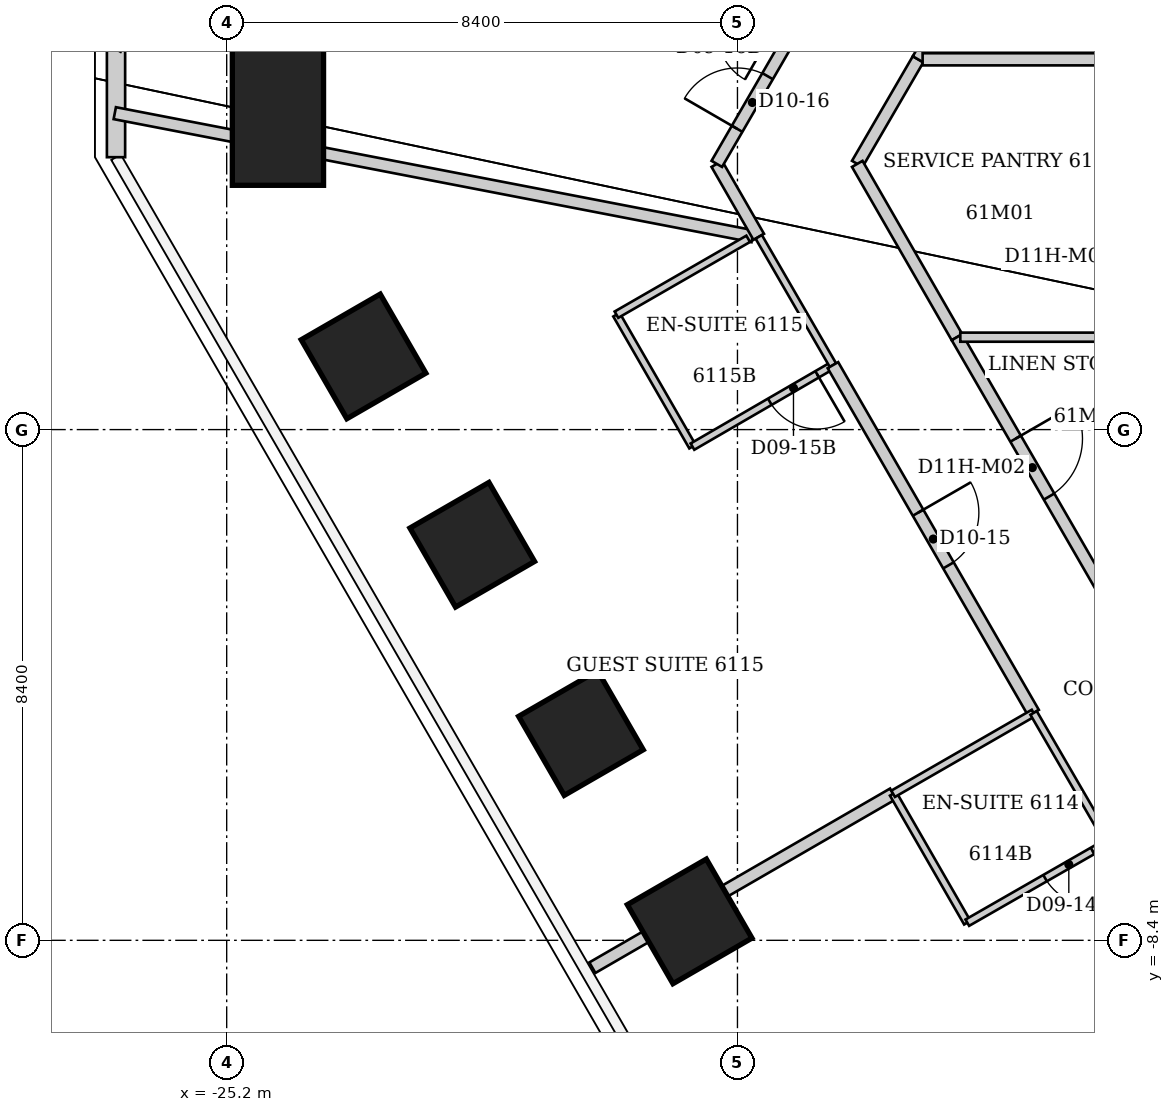
"""IFC4 building model, lengths in metres.
Left out: names, types, materials, properties, quantities, classifications, styles, units other than length and angle.
Written with IfcOpenShell. Run it as: python <this file> out.ifc"""

import sys

from ifc_helpers import new_model, si_unit, direction, frame, frame_2d, origin, origin_2d, place, context, subcontext, project, spatial, rectangle, extrude, element, fill, save


model = new_model("IFC4")
c1 = context("Model", 3, precision=1e-05, world=origin(), true_north=direction((0.0, 1.0)))
c2 = subcontext(c1, "Body", "Model", "MODEL_VIEW")
j1 = project(units=[si_unit("LENGTHUNIT", "METRE"), si_unit("PLANEANGLEUNIT", "RADIAN")], contexts=[c1])
p1 = place(None, origin())
s1 = spatial("IfcSite", under=j1, at=p1, CompositionType="ELEMENT")
p2 = place(p1, origin())
s2 = spatial("IfcBuilding", under=s1, at=p2, CompositionType="ELEMENT")
p3 = place(p2, frame((0.0, 0.0, 244.0)))
s3 = spatial("IfcBuildingStorey", under=s2, at=p3, CompositionType="ELEMENT", Elevation=244.0)
p4 = place(p3, frame((-17.586, -8.089, 0.0), z_axis=(0.049844531908, 0.022901541687, 0.998494387579), x_axis=(-0.864791617374, -0.499151535401, 0.054618707667)))
e1 = element("IfcColumn", 1, at=p4, inside=s3, PredefinedType="COLUMN", context=c2, shape_type="SweptSolid", body=[
    extrude(rectangle(XDim=1.5, YDim=1.5, at=origin_2d()), origin(), (0.0, 0.0, 1.0), 3.806),
])
p5 = place(p3, frame((-19.374, -4.991, 0.0), z_axis=(0.054906736272, 0.014111544369, 0.998391764102), x_axis=(-0.864606052926, -0.499473967902, 0.054608869531)))
e2 = element("IfcColumn", 2, at=p5, inside=s3, PredefinedType="COLUMN", context=c2, shape_type="SweptSolid", body=[
    extrude(rectangle(XDim=1.5, YDim=1.5, at=origin_2d()), origin(), (0.0, 0.0, 1.0), 3.806),
])
p6 = place(p3, frame((-21.162, -1.894, 0.0), z_axis=(0.059897811742, 0.005386955232, 0.998189978342), x_axis=(-0.863828729651, -0.500824842558, 0.05453808675)))
e3 = element("IfcColumn", 3, at=p6, inside=s3, PredefinedType="COLUMN", context=c2, shape_type="SweptSolid", body=[
    extrude(rectangle(XDim=1.5, YDim=1.5, at=origin_2d()), origin(), (0.0, 0.0, 1.0), 3.807),
])
p7 = place(p3, frame((-22.949, 1.203, 0.0), z_axis=(0.064944143672, -0.003397867339, 0.997883115751), x_axis=(-0.863717362202, -0.501020333053, 0.054506367508)))
e4 = element("IfcColumn", 4, at=p7, inside=s3, PredefinedType="COLUMN", context=c2, shape_type="SweptSolid", body=[
    extrude(rectangle(XDim=1.5, YDim=1.5, at=origin_2d()), origin(), (0.0, 0.0, 1.0), 3.808),
])
p8 = place(p3, frame((-24.357, 5.143, 0.0), z_axis=(0.069531443306, -0.014675300016, 0.997471811111), x_axis=(-0.99757975799, -0.001092604117, 0.069522893098)))
e5 = element("IfcColumn", 5, at=p8, inside=s3, PredefinedType="COLUMN", context=c2, shape_type="SweptSolid", body=[
    extrude(rectangle(XDim=1.5, YDim=2.25, at=origin_2d()), origin(), (0.0, 0.0, 1.0), 3.81),
])
p9 = place(p3, frame((-27.02, 4.48, 0.0), z_axis=(0.0, 0.0, 1.0), x_axis=(0.0, 1.0, 0.0)))
e6 = element("IfcWall", 6, at=p9, inside=s3, PredefinedType="SOLIDWALL", context=c2, shape_type="SweptSolid", body=[
    extrude(rectangle(XDim=1.77, YDim=0.3, at=frame_2d((0.885, 0.0))), origin(), (0.0, 0.0, 1.0), 3.64),
])
p10 = place(p3, frame((-27.041, 5.204, 0.0), z_axis=(0.0, 0.0, 1.0), x_axis=(0.981884490433, -0.18948046719, 0.0)))
e7 = element("IfcWall", 7, at=p10, inside=s3, PredefinedType="PARTITIONING", context=c2, shape_type="SweptSolid", body=[
    extrude(rectangle(XDim=10.684, YDim=0.2, at=frame_2d((5.342, 0.0))), origin(), (0.0, 0.0, 1.0), 3.64),
])
p11 = place(p3, frame((-19.186, -8.85, 0.0), z_axis=(0.0, 0.0, 1.0), x_axis=(0.865702137343, 0.500559496364, 0.0)))
e8 = element("IfcWall", 8, at=p11, inside=s3, PredefinedType="PARTITIONING", context=c2, shape_type="SweptSolid", body=[
    extrude(rectangle(XDim=5.713, YDim=0.2, at=frame_2d((2.857, 0.0))), origin(), (0.0, 0.0, 1.0), 3.64),
])
p12 = place(p3, frame((-18.79, 1.89, 0.0), z_axis=(0.0, 0.0, 1.0), x_axis=(0.499159685399, -0.866510016372, 0.0)))
e9 = element("IfcWall", 9, at=p12, inside=s3, PredefinedType="PARTITIONING", context=c2, shape_type="SweptSolid", body=[
    extrude(rectangle(XDim=2.504, YDim=0.12, at=frame_2d((1.252, 0.0))), origin(), (0.0, 0.0, 1.0), 3.64),
])
p13 = place(p3, frame((-17.54, -0.28, 0.0), z_axis=(0.0, 0.0, 1.0), x_axis=(0.86498992408, 0.501789229896, 0.0)))
e10 = element("IfcWall", 10, at=p13, inside=s3, PredefinedType="PARTITIONING", context=c2, shape_type="SweptSolid", body=[
    extrude(rectangle(XDim=2.671, YDim=0.12, at=frame_2d((1.335, 0.0))), origin(), (0.0, 0.0, 1.0), 3.64),
])
p14 = place(p13, frame((1.47, 0.0, 0.0)))
e11 = element("IfcOpeningElement", 11, at=p14, cuts=e10, PredefinedType="OPENING", context=c2, shape_type="SweptSolid", body=[
    extrude(rectangle(XDim=0.9, YDim=2.03, at=frame_2d((0.45, 1.015))), frame((0.0, 0.06, 0.0), z_axis=(0.0, -1.0, 0.0), x_axis=(1.0, 0.0, 0.0)), (0.0, 0.0, 1.0), 0.12),
])
p15 = place(p3, frame((-17.14, 4.37, 0.0), z_axis=(0.0, 0.0, 1.0), x_axis=(0.498378346744, -0.866959643522, 0.0)))
e12 = element("IfcWall", 12, at=p15, inside=s3, PredefinedType="PARTITIONING", context=c2, shape_type="SweptSolid", body=[
    extrude(rectangle(XDim=1.384, YDim=0.2, at=frame_2d((0.692, 0.0))), origin(), (0.0, 0.0, 1.0), 3.64),
])
p16 = place(p3, frame((-17.14, 4.37, 0.0), z_axis=(0.0, 0.0, 1.0), x_axis=(0.501176435338, 0.865345122285, 0.0)))
e13 = element("IfcWall", 13, at=p16, inside=s3, PredefinedType="PARTITIONING", context=c2, shape_type="SweptSolid", body=[
    extrude(rectangle(XDim=2.334, YDim=0.2, at=frame_2d((1.167, 0.0))), origin(), (0.0, 0.0, 1.0), 3.64),
])
p17 = place(p16, frame((0.667, 0.0, 0.0)))
e14 = element("IfcOpeningElement", 14, at=p17, cuts=e13, PredefinedType="OPENING", context=c2, shape_type="SweptSolid", body=[
    extrude(rectangle(XDim=1.0, YDim=2.13, at=frame_2d((0.5, 1.065))), frame((0.0, 0.1, 0.0), z_axis=(0.0, -1.0, 0.0), x_axis=(1.0, 0.0, 0.0)), (0.0, 0.0, 1.0), 0.2),
])
p18 = place(p3, frame((-16.624, 3.138, 0.0), z_axis=(0.0, 0.0, 1.0), x_axis=(-0.866525185869, -0.499133351175, 0.0)))
e15 = element("IfcWall", 15, at=p18, inside=s3, PredefinedType="PARTITIONING", context=c2, shape_type="SweptSolid", body=[
    extrude(rectangle(XDim=2.5, YDim=0.12, at=frame_2d((1.25, 0.0))), origin(), (0.0, 0.0, 1.0), 3.64),
])
p19 = place(p3, frame((-16.45, 3.17, 0.0), z_axis=(0.0, 0.0, 1.0), x_axis=(0.500566296323, -0.865698205488, 0.0)))
e16 = element("IfcWall", 16, at=p19, inside=s3, PredefinedType="PARTITIONING", context=c2, shape_type="SweptSolid", body=[
    extrude(rectangle(XDim=2.437, YDim=0.12, at=frame_2d((1.219, 0.0))), origin(), (0.0, 0.0, 1.0), 3.64),
])
p20 = place(p3, frame((-15.23, 1.06, 0.0), z_axis=(0.0, 0.0, 1.0), x_axis=(0.499729921425, -0.866181277581, 0.0)))
e17 = element("IfcWall", 17, at=p20, inside=s3, PredefinedType="PARTITIONING", context=c2, shape_type="SweptSolid", body=[
    extrude(rectangle(XDim=6.604, YDim=0.2, at=frame_2d((3.302, 0.0))), origin(), (0.0, 0.0, 1.0), 3.64),
])
p21 = place(p20, frame((2.802, 0.0, 0.0)))
e18 = element("IfcOpeningElement", 18, at=p21, cuts=e17, PredefinedType="OPENING", context=c2, shape_type="SweptSolid", body=[
    extrude(rectangle(XDim=1.0, YDim=2.13, at=frame_2d((0.5, 1.065))), frame((0.0, 0.1, 0.0), z_axis=(0.0, -1.0, 0.0), x_axis=(1.0, 0.0, 0.0)), (0.0, 0.0, 1.0), 0.2),
])
p22 = place(p3, frame((-14.83, 4.37, 0.0), z_axis=(0.0, 0.0, 1.0), x_axis=(0.502626855825, 0.864503466623, 0.0)))
e19 = element("IfcWall", 19, at=p22, inside=s3, PredefinedType="PARTITIONING", context=c2, shape_type="SweptSolid", body=[
    extrude(rectangle(XDim=1.99, YDim=0.2, at=frame_2d((0.995, 0.0))), origin(), (0.0, 0.0, 1.0), 3.64),
])
p23 = place(p3, frame((-14.24, -5.99, 0.0), z_axis=(0.0, 0.0, 1.0), x_axis=(0.498748634132, -0.866746675766, 0.0)))
e20 = element("IfcWall", 20, at=p23, inside=s3, PredefinedType="PARTITIONING", context=c2, shape_type="SweptSolid", body=[
    extrude(rectangle(XDim=2.446, YDim=0.12, at=frame_2d((1.223, 0.0))), origin(), (0.0, 0.0, 1.0), 3.64),
])
p24 = place(p3, frame((-14.24, -5.99, 0.0), z_axis=(0.0, 0.0, 1.0), x_axis=(0.866615255992, 0.498976951453, 0.0)))
e21 = element("IfcWall", 21, at=p24, inside=s3, PredefinedType="PARTITIONING", context=c2, shape_type="SweptSolid", body=[
    extrude(rectangle(XDim=2.666, YDim=0.12, at=frame_2d((1.333, 0.0))), origin(), (0.0, 0.0, 1.0), 3.64),
])
p25 = place(p3, frame((-13.83, 6.09, 0.0), z_axis=(0.0, 0.0, 1.0), x_axis=(0.500248310865, 0.865881993967, 0.0)))
e22 = element("IfcWall", 22, at=p25, inside=s3, PredefinedType="PARTITIONING", context=c2, shape_type="SweptSolid", body=[
    extrude(rectangle(XDim=5.278, YDim=0.2, at=frame_2d((2.639, 0.0))), origin(), (0.0, 0.0, 1.0), 3.64),
])
p26 = place(p3, frame((-13.755, 6.09, 0.0), z_axis=(0.0, 0.0, 1.0), x_axis=(1.0, 0.0, 0.0)))
e23 = element("IfcWall", 23, at=p26, inside=s3, PredefinedType="PARTITIONING", context=c2, shape_type="SweptSolid", body=[
    extrude(rectangle(XDim=3.195, YDim=0.2, at=frame_2d((1.597, 0.0))), origin(), (0.0, 0.0, 1.0), 3.64),
])
p27 = place(p3, frame((-13.19, 1.52, 0.0), z_axis=(0.0, 0.0, 1.0), x_axis=(-0.498775186059, 0.866731396554, 0.0)))
e24 = element("IfcWall", 24, at=p27, inside=s3, PredefinedType="PARTITIONING", context=c2, shape_type="SweptSolid", body=[
    extrude(rectangle(XDim=3.288, YDim=0.2, at=frame_2d((1.644, 0.0))), origin(), (0.0, 0.0, 1.0), 3.64),
])
p28 = place(p3, frame((-13.02, -8.11, 0.0), z_axis=(0.0, 0.0, 1.0), x_axis=(0.867545659855, 0.497357545501, 0.0)))
e25 = element("IfcWall", 25, at=p28, inside=s3, PredefinedType="PARTITIONING", context=c2, shape_type="SweptSolid", body=[
    extrude(rectangle(XDim=2.674, YDim=0.12, at=frame_2d((1.337, 0.0))), origin(), (0.0, 0.0, 1.0), 3.64),
])
p29 = place(p28, frame((1.474, 0.0, 0.0)))
e26 = element("IfcOpeningElement", 26, at=p29, cuts=e25, PredefinedType="OPENING", context=c2, shape_type="SweptSolid", body=[
    extrude(rectangle(XDim=0.9, YDim=2.03, at=frame_2d((0.45, 1.015))), frame((0.0, 0.06, 0.0), z_axis=(0.0, -1.0, 0.0), x_axis=(1.0, 0.0, 0.0)), (0.0, 0.0, 1.0), 0.12),
])
p30 = place(p3, frame((-11.93, -4.66, 0.0), z_axis=(0.0, 0.0, 1.0), x_axis=(0.501813488763, -0.864975850817, 0.0)))
e27 = element("IfcWall", 27, at=p30, inside=s3, PredefinedType="PARTITIONING", context=c2, shape_type="SweptSolid", body=[
    extrude(rectangle(XDim=2.451, YDim=0.12, at=frame_2d((1.226, 0.0))), origin(), (0.0, 0.0, 1.0), 3.64),
])
p31 = place(p3, frame((-10.55, -3.05, 0.0), z_axis=(0.0, 0.0, 1.0), x_axis=(-0.500193590286, 0.865913605527, 0.0)))
e28 = element("IfcWall", 28, at=p31, inside=s3, PredefinedType="PARTITIONING", context=c2, shape_type="SweptSolid", body=[
    extrude(rectangle(XDim=5.278, YDim=0.2, at=frame_2d((2.639, 0.0))), origin(), (0.0, 0.0, 1.0), 3.64),
])
p32 = place(p31, frame((2.25, 0.0, 0.0)))
e29 = element("IfcOpeningElement", 29, at=p32, cuts=e28, PredefinedType="OPENING", context=c2, shape_type="SweptSolid", body=[
    extrude(rectangle(XDim=1.1, YDim=2.2, at=frame_2d((0.55, 1.1))), frame((0.0, 0.1, 0.0), z_axis=(0.0, -1.0, 0.0), x_axis=(1.0, 0.0, 0.0)), (0.0, 0.0, 1.0), 0.2),
])
p33 = place(p3, frame((-10.55, 1.52, 0.0), z_axis=(0.0, 0.0, 1.0), x_axis=(-1.0, 0.0, 0.0)))
e30 = element("IfcWall", 30, at=p33, inside=s3, PredefinedType="PARTITIONING", context=c2, shape_type="SweptSolid", body=[
    extrude(rectangle(XDim=2.585, YDim=0.15, at=frame_2d((1.292, 0.0))), origin(), (0.0, 0.0, 1.0), 3.64),
])
p34 = place(p29, origin())
e31 = element("IfcDoor", 31, at=p34, inside=s3, OperationType="SINGLE_SWING_RIGHT", PredefinedType="DOOR", context=c2, shape_type="SweptSolid", body=[
    extrude(rectangle(XDim=0.9, YDim=2.03, at=frame_2d((0.45, 1.015))), frame((0.0, 0.025, 0.0), z_axis=(0.0, -1.0, 0.0), x_axis=(1.0, 0.0, 0.0)), (0.0, 0.0, 1.0), 0.05),
])
fill(e26, e31)
p35 = place(p21, origin())
e32 = element("IfcDoor", 32, at=p35, inside=s3, OperationType="SINGLE_SWING_LEFT", PredefinedType="DOOR", context=c2, shape_type="SweptSolid", body=[
    extrude(rectangle(XDim=1.0, YDim=2.13, at=frame_2d((0.5, 1.065))), frame((0.0, 0.025, 0.0), z_axis=(0.0, -1.0, 0.0), x_axis=(1.0, 0.0, 0.0)), (0.0, 0.0, 1.0), 0.05),
])
fill(e18, e32)
p36 = place(p14, origin())
e33 = element("IfcDoor", 33, at=p36, inside=s3, OperationType="SINGLE_SWING_RIGHT", PredefinedType="DOOR", context=c2, shape_type="SweptSolid", body=[
    extrude(rectangle(XDim=0.9, YDim=2.03, at=frame_2d((0.45, 1.015))), frame((0.0, 0.025, 0.0), z_axis=(0.0, -1.0, 0.0), x_axis=(1.0, 0.0, 0.0)), (0.0, 0.0, 1.0), 0.05),
])
fill(e11, e33)
p37 = place(p17, origin())
e34 = element("IfcDoor", 34, at=p37, inside=s3, OperationType="SINGLE_SWING_LEFT", PredefinedType="DOOR", context=c2, shape_type="SweptSolid", body=[
    extrude(rectangle(XDim=1.0, YDim=2.13, at=frame_2d((0.5, 1.065))), frame((0.0, 0.025, 0.0), z_axis=(0.0, -1.0, 0.0), x_axis=(1.0, 0.0, 0.0)), (0.0, 0.0, 1.0), 0.05),
])
fill(e14, e34)
p38 = place(p32, origin())
e35 = element("IfcDoor", 35, at=p38, inside=s3, OperationType="SINGLE_SWING_RIGHT", PredefinedType="DOOR", context=c2, shape_type="SweptSolid", body=[
    extrude(rectangle(XDim=1.1, YDim=2.2, at=frame_2d((0.55, 1.1))), frame((0.0, 0.025, 0.0), z_axis=(0.0, -1.0, 0.0), x_axis=(1.0, 0.0, 0.0)), (0.0, 0.0, 1.0), 0.05),
])
fill(e29, e35)
save(model, sys.argv[1])
